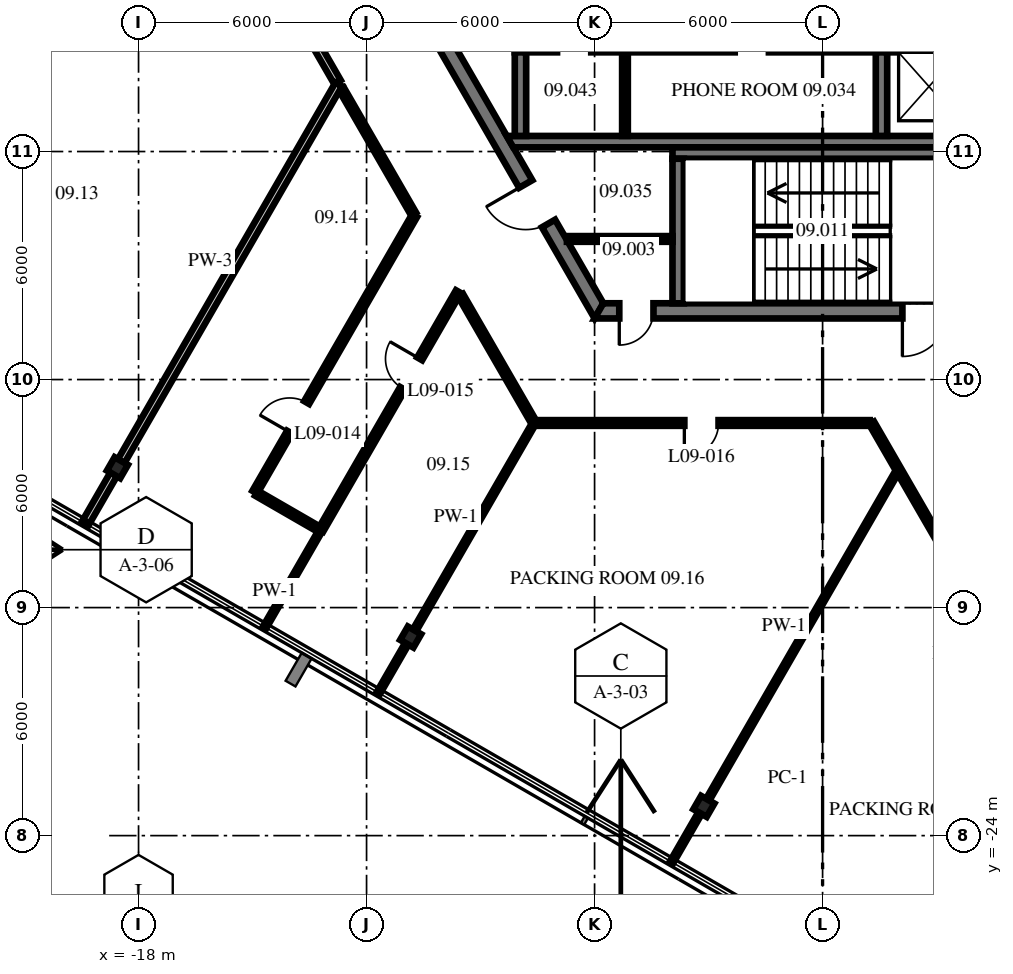
"""IFC4 building model, lengths in metres.
Left out: names, types, materials, properties, quantities, classifications, styles, units other than length and angle.
Written with IfcOpenShell. Run it as: python <this file> out.ifc"""

import sys

from ifc_helpers import new_model, si_unit, direction, frame, frame_2d, origin, origin_2d, place, context, subcontext, project, spatial, polyline, rectangle, i_section, outline, extrude, source, transform, mapped, element, fill, save


model = new_model("IFC4")
c1 = context("Model", 3, precision=1e-05, world=origin(), true_north=direction((0.0, 1.0)))
c2 = subcontext(c1, "Body", "Model", "MODEL_VIEW")
j1 = project(units=[si_unit("LENGTHUNIT", "METRE"), si_unit("PLANEANGLEUNIT", "RADIAN")], contexts=[c1])
p1 = place(None, origin())
s1 = spatial("IfcSite", under=j1, at=p1, CompositionType="ELEMENT")
p2 = place(p1, origin())
s2 = spatial("IfcBuilding", under=s1, at=p2, CompositionType="ELEMENT")
p3 = place(p2, frame((0.0, 0.0, 41.8)))
s3 = spatial("IfcBuildingStorey", under=s2, at=p3, CompositionType="ELEMENT", Elevation=41.8)
m1 = source(origin(), c2, "Body", "SweptSolid", [
    extrude(i_section(OverallWidth=0.404, OverallDepth=0.406, WebThickness=0.027, FlangeThickness=0.044, at=origin_2d()), origin(), (0.0, 0.0, 1.0), 4.3),
])
for number, where, z_axis, x_axis in (
    (1, (-18.556, -14.32, 0.0), (0.0, 0.0, 1.0), (0.866, -0.5, 0.0)),
    (2, (-10.84, -18.775, 0.0), (0.0, 0.0, 1.0), (0.866, -0.5, 0.0)),
    (3, (-3.124, -23.23, 0.0), (0.0, 0.0, 1.0), (0.866, -0.5, 0.0)),
):
    element("IfcColumn", number, at=place(p3, frame(where, z_axis=z_axis, x_axis=x_axis)), inside=s3, PredefinedType="COLUMN", context=c2, shape_type="MappedRepresentation", body=[
        mapped(m1, transform((0.0, 0.0, 0.0), scale=1.0)),
    ])
m2 = source(origin(), c2, "Body", "SweptSolid", [
    extrude(outline(polyline([(-0.115, -0.2), (11.885, -0.2), (11.654, 0.2), (0.115, 0.2), (-0.115, -0.2)])), origin(), (0.0, 0.0, 1.0), 4.1),
])
p4 = place(p3, frame((-11.769, 0.0, 0.0), z_axis=(0.0, 0.0, 1.0), x_axis=(0.499996592174, -0.866027371285, 0.0)))
e4 = element("IfcWall", 4, at=p4, inside=s3, PredefinedType="SHEAR", context=c2, shape_type="MappedRepresentation", body=[
    mapped(m2, transform((0.0, 0.0, 0.0), scale=1.0)),
])
p5 = place(p4, frame((1.405, 0.0, 0.0)))
e5 = element("IfcOpeningElement", 5, at=p5, cuts=e4, PredefinedType="OPENING", context=c2, shape_type="SweptSolid", body=[
    extrude(rectangle(XDim=1.8, YDim=2.1, at=frame_2d((0.9, 1.05))), frame((0.0, 0.21, 0.0), z_axis=(0.0, -1.0, 0.0), x_axis=(1.0, 0.0, 0.0)), (0.0, 0.0, 1.0), 0.42),
])
p6 = place(p4, frame((7.915, 0.0, 0.0)))
e6 = element("IfcOpeningElement", 6, at=p6, cuts=e4, PredefinedType="OPENING", context=c2, shape_type="SweptSolid", body=[
    extrude(rectangle(XDim=1.2, YDim=2.1, at=frame_2d((0.6, 1.05))), frame((0.0, 0.21, 0.0), z_axis=(0.0, -1.0, 0.0), x_axis=(1.0, 0.0, 0.0)), (0.0, 0.0, 1.0), 0.42),
])
p7 = place(p3, frame((-5.885, -10.192, 0.0), z_axis=(0.0, 0.0, 1.0), x_axis=(1.0, 0.0, 0.0)))
e7 = element("IfcWall", 7, at=p7, inside=s3, PredefinedType="SHEAR", context=c2, shape_type="MappedRepresentation", body=[
    mapped(m2, transform((0.0, 0.0, 0.0), scale=1.0)),
])
p8 = place(p7, frame((7.985, 0.0, 0.0)))
e8 = element("IfcOpeningElement", 8, at=p8, cuts=e7, PredefinedType="OPENING", context=c2, shape_type="SweptSolid", body=[
    extrude(rectangle(XDim=1.2, YDim=2.1, at=frame_2d((0.6, 1.05))), frame((0.0, 0.21, 0.0), z_axis=(0.0, -1.0, 0.0), x_axis=(1.0, 0.0, 0.0)), (0.0, 0.0, 1.0), 0.42),
])
p9 = place(p7, frame((0.534, 0.0, 0.0)))
e9 = element("IfcOpeningElement", 9, at=p9, cuts=e7, PredefinedType="OPENING", context=c2, shape_type="SweptSolid", body=[
    extrude(rectangle(XDim=0.9, YDim=2.1, at=frame_2d((0.45, 1.05))), frame((0.0, 0.21, 0.0), z_axis=(0.0, -1.0, 0.0), x_axis=(1.0, 0.0, 0.0)), (0.0, 0.0, 1.0), 0.42),
])
m3 = source(origin(), c2, "Body", "SweptSolid", [
    extrude(rectangle(XDim=12.8, YDim=0.3, at=frame_2d((6.4, 0.0))), origin(), (0.0, 0.0, 1.0), 4.1),
])
p10 = place(p3, frame((-8.1, -3.24, 0.0), z_axis=(0.0, 0.0, 1.0), x_axis=(1.0, 0.0, 0.0)))
e10 = element("IfcWall", 10, at=p10, inside=s3, PredefinedType="SHEAR", context=c2, shape_type="MappedRepresentation", body=[
    mapped(m3, transform((0.0, 0.0, 0.0), scale=1.0)),
])
p11 = place(p10, frame((1.113, 0.0, 0.0)))
e11 = element("IfcOpeningElement", 11, at=p11, cuts=e10, PredefinedType="OPENING", context=c2, shape_type="SweptSolid", body=[
    extrude(rectangle(XDim=0.9, YDim=2.1, at=frame_2d((0.45, 1.05))), frame((0.0, 0.16, 0.0), z_axis=(0.0, -1.0, 0.0), x_axis=(1.0, 0.0, 0.0)), (0.0, 0.0, 1.0), 0.32),
])
p12 = place(p10, frame((5.788, 0.0, 0.0)))
e12 = element("IfcOpeningElement", 12, at=p12, cuts=e10, PredefinedType="OPENING", context=c2, shape_type="SweptSolid", body=[
    extrude(rectangle(XDim=0.9, YDim=2.1, at=frame_2d((0.45, 1.05))), frame((0.0, 0.16, 0.0), z_axis=(0.0, -1.0, 0.0), x_axis=(1.0, 0.0, 0.0)), (0.0, 0.0, 1.0), 0.32),
])
p13 = place(p10, frame((10.35, 0.0, 0.0)))
e13 = element("IfcOpeningElement", 13, at=p13, cuts=e10, PredefinedType="OPENING", context=c2, shape_type="SweptSolid", body=[
    extrude(rectangle(XDim=1.1, YDim=2.1, at=frame_2d((0.55, 1.05))), frame((0.0, 0.16, 0.0), z_axis=(0.0, -1.0, 0.0), x_axis=(1.0, 0.0, 0.0)), (0.0, 0.0, 1.0), 0.32),
])
m4 = source(origin(), c2, "Body", "SweptSolid", [
    extrude(outline(polyline([(12.0, -0.15), (-0.04, -0.15), (-0.213, 0.15), (12.0, 0.15), (12.0, -0.15)])), origin(), (0.0, 0.0, 1.0), 4.1),
])
p14 = place(p3, frame((-8.1, -5.74, 0.0), z_axis=(0.0, 0.0, 1.0), x_axis=(1.0, 0.0, 0.0)))
e14 = element("IfcWall", 14, at=p14, inside=s3, PredefinedType="SHEAR", context=c2, shape_type="MappedRepresentation", body=[
    mapped(m4, transform((0.0, 0.0, 0.0), scale=1.0)),
])
m5 = source(origin(), c2, "Body", "SweptSolid", [
    extrude(rectangle(XDim=2.2, YDim=0.3, at=frame_2d((1.1, 0.0))), origin(), (0.0, 0.0, 1.0), 4.1),
])
for number, where, z_axis, x_axis in (
    (15, (-7.95, -5.59, 0.0), (0.0, 0.0, 1.0), (0.0, 1.0, 0.0)),
    (16, (1.55, -5.59, 0.0), (0.0, 0.0, 1.0), (0.0, 1.0, 0.0)),
):
    element("IfcWall", number, at=place(p3, frame(where, z_axis=z_axis, x_axis=x_axis)), inside=s3, PredefinedType="SHEAR", context=c2, shape_type="MappedRepresentation", body=[
        mapped(m5, transform((0.0, 0.0, 0.0), scale=1.0)),
    ])
m6 = source(origin(), c2, "Body", "SweptSolid", [
    extrude(outline(polyline([(0.0, -0.15), (8.95, -0.15), (8.65, 0.15), (0.0, 0.15), (0.0, -0.15)])), origin(), (0.0, 0.0, 1.0), 4.1),
])
p15 = place(p3, frame((-3.95, -6.04, 0.0), z_axis=(0.0, 0.0, 1.0), x_axis=(1.0, 0.0, 0.0)))
e17 = element("IfcWall", 17, at=p15, inside=s3, PredefinedType="SHEAR", context=c2, shape_type="MappedRepresentation", body=[
    mapped(m6, transform((0.0, 0.0, 0.0), scale=1.0)),
])
m7 = source(origin(), c2, "Body", "SweptSolid", [
    extrude(outline(polyline([(3.8, -0.15), (-0.004, -0.15), (-0.004, 0.15), (3.8, 0.15), (3.8, -0.15)])), origin(), (0.0, 0.0, 1.0), 4.1),
])
p16 = place(p3, frame((-3.8, -9.99, 0.0), z_axis=(0.0, 0.0, 1.0), x_axis=(0.0, 1.0, 0.0)))
e18 = element("IfcWall", 18, at=p16, inside=s3, PredefinedType="SHEAR", context=c2, shape_type="MappedRepresentation", body=[
    mapped(m7, transform((0.0, 0.0, 0.0), scale=1.0)),
])
m8 = source(origin(), c2, "Body", "SweptSolid", [
    extrude(rectangle(XDim=2.2, YDim=0.15, at=frame_2d((1.1, 0.0))), origin(), (0.0, 0.0, 1.0), 4.1),
])
p17 = place(p3, frame((-5.2, -5.59, 0.0), z_axis=(0.0, 0.0, 1.0), x_axis=(0.0, 1.0, 0.0)))
e19 = element("IfcWall", 19, at=p17, inside=s3, PredefinedType="PARTITIONING", context=c2, shape_type="MappedRepresentation", body=[
    mapped(m8, transform((0.0, 0.0, 0.0), scale=1.0)),
])
m9 = source(origin(), c2, "Body", "SweptSolid", [
    extrude(rectangle(XDim=2.777, YDim=0.15, at=frame_2d((1.389, 0.0))), origin(), (0.0, 0.0, 1.0), 4.1),
])
p18 = place(p3, frame((-6.727, -8.3, 0.0), z_axis=(0.0, 0.0, 1.0), x_axis=(1.0, 0.0, 0.0)))
e20 = element("IfcWall", 20, at=p18, inside=s3, PredefinedType="PARTITIONING", context=c2, shape_type="MappedRepresentation", body=[
    mapped(m9, transform((0.0, 0.0, 0.0), scale=1.0)),
])
p19 = place(p3, frame((-15.14, -0.061, 0.0), z_axis=(0.0, 0.0, 1.0), x_axis=(0.500002721793, -0.866023832351, 0.0)))
e21 = element("IfcWall", 21, at=p19, inside=s3, PredefinedType="PARTITIONING", context=c2, shape_type="SweptSolid", body=[
    extrude(rectangle(XDim=4.75, YDim=0.2, at=frame_2d((2.375, 0.0))), origin(), (0.0, 0.0, 1.0), 4.1),
])
p20 = place(p19, frame((1.88, 0.0, 0.0)))
e22 = element("IfcOpeningElement", 22, at=p20, cuts=e21, PredefinedType="OPENING", context=c2, shape_type="SweptSolid", body=[
    extrude(rectangle(XDim=1.0, YDim=2.1, at=frame_2d((0.5, 1.05))), frame((0.0, 0.11, 0.0), z_axis=(0.0, -1.0, 0.0), x_axis=(1.0, 0.0, 0.0)), (0.0, 0.0, 1.0), 0.22),
])
p21 = place(p3, frame((-12.665, -4.348, 0.0), z_axis=(0.0, 0.0, 1.0), x_axis=(0.500009333805, -0.866020014843, 0.0)))
e23 = element("IfcWall", 23, at=p21, inside=s3, PredefinedType="PARTITIONING", context=c2, shape_type="SweptSolid", body=[
    extrude(rectangle(XDim=3.806, YDim=0.15, at=frame_2d((1.903, 0.0))), origin(), (0.0, 0.0, 1.0), 4.1),
])
p22 = place(p3, frame((-9.527, -9.783, 0.0), z_axis=(0.0, 0.0, 1.0), x_axis=(0.500013098431, -0.86601784127, 0.0)))
e24 = element("IfcWall", 24, at=p22, inside=s3, PredefinedType="PARTITIONING", context=c2, shape_type="SweptSolid", body=[
    extrude(rectangle(XDim=3.83, YDim=0.15, at=frame_2d((1.915, 0.0))), origin(), (0.0, 0.0, 1.0), 4.1),
])
p23 = place(p3, frame((1.289, -13.142, 0.0), z_axis=(0.0, 0.0, 1.0), x_axis=(0.500002274473, -0.866024090613, 0.0)))
e25 = element("IfcWall", 25, at=p23, inside=s3, PredefinedType="PARTITIONING", context=c2, shape_type="SweptSolid", body=[
    extrude(rectangle(XDim=19.385, YDim=0.15, at=frame_2d((9.692, 0.0))), origin(), (0.0, 0.0, 1.0), 4.1),
])
p24 = place(p23, frame((6.062, 0.0, 0.0)))
e26 = element("IfcOpeningElement", 26, at=p24, cuts=e25, PredefinedType="OPENING", context=c2, shape_type="SweptSolid", body=[
    extrude(rectangle(XDim=0.9, YDim=2.1, at=frame_2d((0.45, 1.05))), frame((0.0, 0.085, 0.0), z_axis=(0.0, -1.0, 0.0), x_axis=(1.0, 0.0, 0.0)), (0.0, 0.0, 1.0), 0.17),
])
p25 = place(p23, frame((15.05, 0.0, 0.0)))
e27 = element("IfcOpeningElement", 27, at=p25, cuts=e25, PredefinedType="OPENING", context=c2, shape_type="SweptSolid", body=[
    extrude(rectangle(XDim=0.9, YDim=2.1, at=frame_2d((0.45, 1.05))), frame((0.0, 0.085, 0.0), z_axis=(0.0, -1.0, 0.0), x_axis=(1.0, 0.0, 0.0)), (0.0, 0.0, 1.0), 0.17),
])
m10 = source(origin(), c2, "Body", "SweptSolid", [
    extrude(rectangle(XDim=1.89, YDim=0.15, at=frame_2d((0.945, 0.0))), origin(), (0.0, 0.0, 1.0), 4.1),
])
p26 = place(p3, frame((-14.896, -14.991, 0.0), z_axis=(0.0, 0.0, 1.0), x_axis=(0.866000578957, -0.500042995397, 0.0)))
e28 = element("IfcWall", 28, at=p26, inside=s3, PredefinedType="PARTITIONING", context=c2, shape_type="MappedRepresentation", body=[
    mapped(m10, transform((0.0, 0.0, 0.0), scale=1.0)),
])
p27 = place(p3, frame((-7.588, -13.142, 0.0), z_axis=(0.0, 0.0, 1.0), x_axis=(1.0, 0.0, 0.0)))
e29 = element("IfcWall", 29, at=p27, inside=s3, PredefinedType="PARTITIONING", context=c2, shape_type="SweptSolid", body=[
    extrude(rectangle(XDim=8.827, YDim=0.15, at=frame_2d((4.413, 0.0))), origin(), (0.0, 0.0, 1.0), 4.1),
])
p28 = place(p27, frame((3.95, 0.0, 0.0)))
e30 = element("IfcOpeningElement", 30, at=p28, cuts=e29, PredefinedType="OPENING", context=c2, shape_type="SweptSolid", body=[
    extrude(rectangle(XDim=0.9, YDim=2.1, at=frame_2d((0.45, 1.05))), frame((0.0, 0.085, 0.0), z_axis=(0.0, -1.0, 0.0), x_axis=(1.0, 0.0, 0.0)), (0.0, 0.0, 1.0), 0.17),
])
m11 = source(origin(), c2, "Body", "SweptSolid", [
    extrude(rectangle(XDim=1.499, YDim=0.1, at=frame_2d((0.75, 0.0))), origin(), (0.0, 0.0, 1.0), 4.1),
])
p29 = place(p3, frame((-3.969, -24.695, 0.0), z_axis=(0.0, 0.0, 1.0), x_axis=(0.499905760005, 0.866079806435, 0.0)))
e31 = element("IfcWall", 31, at=p29, inside=s3, PredefinedType="PARTITIONING", context=c2, shape_type="MappedRepresentation", body=[
    mapped(m11, transform((0.0, 0.0, 0.0), scale=1.0)),
])
m12 = source(origin(), c2, "Body", "SweptSolid", [
    extrude(rectangle(XDim=9.953, YDim=0.1, at=frame_2d((4.977, 0.0))), origin(), (0.0, 0.0, 1.0), 3.343),
])
p30 = place(p3, frame((-3.027, -23.063, 0.0), z_axis=(0.0, 0.0, 1.0), x_axis=(0.499990692214, 0.866030777571, 0.0)))
e32 = element("IfcWall", 32, at=p30, inside=s3, PredefinedType="PARTITIONING", context=c2, shape_type="MappedRepresentation", body=[
    mapped(m12, transform((0.0, 0.0, 0.0), scale=1.0)),
])
m13 = source(origin(), c2, "Body", "SweptSolid", [
    extrude(rectangle(XDim=1.499, YDim=0.1, at=frame_2d((0.749, 0.0))), origin(), (0.0, 0.0, 1.0), 4.1),
])
p31 = place(p3, frame((-11.686, -20.24, 0.0), z_axis=(0.0, 0.0, 1.0), x_axis=(0.499976292358, 0.866039090965, 0.0)))
e33 = element("IfcWall", 33, at=p31, inside=s3, PredefinedType="PARTITIONING", context=c2, shape_type="MappedRepresentation", body=[
    mapped(m13, transform((0.0, 0.0, 0.0), scale=1.0)),
])
m14 = source(origin(), c2, "Body", "SweptSolid", [
    extrude(rectangle(XDim=6.271, YDim=0.1, at=frame_2d((3.135, 0.0))), origin(), (0.0, 0.0, 1.0), 3.488),
])
p32 = place(p3, frame((-10.743, -18.608, 0.0), z_axis=(0.0, 0.0, 1.0), x_axis=(0.500012281615, 0.866018312875, 0.0)))
e34 = element("IfcWall", 34, at=p32, inside=s3, PredefinedType="PARTITIONING", context=c2, shape_type="MappedRepresentation", body=[
    mapped(m14, transform((0.0, 0.0, 0.0), scale=1.0)),
])
p33 = place(p3, frame((-14.677, -18.513, 0.0), z_axis=(0.0, 0.0, 1.0), x_axis=(0.499959535909, 0.866048764478, 0.0)))
e35 = element("IfcWall", 35, at=p33, inside=s3, PredefinedType="PARTITIONING", context=c2, shape_type="SweptSolid", body=[
    extrude(rectangle(XDim=2.942, YDim=0.1, at=frame_2d((1.471, 0.0))), origin(), (0.0, 0.0, 1.0), 4.1),
])
m15 = source(origin(), c2, "Body", "SweptSolid", [
    extrude(rectangle(XDim=7.249, YDim=0.15, at=frame_2d((3.625, 0.0))), origin(), (0.0, 0.0, 1.0), 4.1),
])
p34 = place(p3, frame((-13.207, -15.965, 0.0), z_axis=(0.0, 0.0, 1.0), x_axis=(0.500014967241, 0.866016762271, 0.0)))
e36 = element("IfcWall", 36, at=p34, inside=s3, PredefinedType="PARTITIONING", context=c2, shape_type="MappedRepresentation", body=[
    mapped(m15, transform((0.0, 0.0, 0.0), scale=1.0)),
])
p35 = place(p34, frame((4.31, 0.0, 0.0)))
e37 = element("IfcOpeningElement", 37, at=p35, cuts=e36, PredefinedType="OPENING", context=c2, shape_type="SweptSolid", body=[
    extrude(rectangle(XDim=0.9, YDim=2.1, at=frame_2d((0.45, 1.05))), frame((0.0, 0.085, 0.0), z_axis=(0.0, -1.0, 0.0), x_axis=(1.0, 0.0, 0.0)), (0.0, 0.0, 1.0), 0.17),
])
p36 = place(p3, frame((-14.939, -14.965, 0.0), z_axis=(0.0, 0.0, 1.0), x_axis=(0.499994897466, 0.866028349714, 0.0)))
e38 = element("IfcWall", 38, at=p36, inside=s3, PredefinedType="PARTITIONING", context=c2, shape_type="SweptSolid", body=[
    extrude(rectangle(XDim=8.403, YDim=0.15, at=frame_2d((4.202, 0.0))), origin(), (0.0, 0.0, 1.0), 4.1),
])
p37 = place(p36, frame((1.826, 0.0, 0.0)))
e39 = element("IfcOpeningElement", 39, at=p37, cuts=e38, PredefinedType="OPENING", context=c2, shape_type="SweptSolid", body=[
    extrude(rectangle(XDim=0.9, YDim=2.1, at=frame_2d((0.45, 1.05))), frame((0.0, 0.085, 0.0), z_axis=(0.0, -1.0, 0.0), x_axis=(1.0, 0.0, 0.0)), (0.0, 0.0, 1.0), 0.17),
])
m16 = source(origin(), c2, "Body", "SweptSolid", [
    extrude(rectangle(XDim=1.499, YDim=0.2, at=frame_2d((0.749, 0.0))), origin(), (0.0, 0.0, 1.0), 4.1),
])
p38 = place(p3, frame((-19.402, -15.785, 0.0), z_axis=(0.0, 0.0, 1.0), x_axis=(0.499976292358, 0.866039090965, 0.0)))
e40 = element("IfcWall", 40, at=p38, inside=s3, PredefinedType="PARTITIONING", context=c2, shape_type="MappedRepresentation", body=[
    mapped(m16, transform((0.0, 0.0, 0.0), scale=1.0)),
])
m17 = source(origin(), c2, "Body", "SweptSolid", [
    extrude(rectangle(XDim=11.455, YDim=0.2, at=frame_2d((5.728, 0.0))), origin(), (0.0, 0.0, 1.0), 3.343),
])
p39 = place(p3, frame((-18.459, -14.153, 0.0), z_axis=(0.0, 0.0, 1.0), x_axis=(0.500008416231, 0.866020544617, 0.0)))
e41 = element("IfcWall", 41, at=p39, inside=s3, PredefinedType="PARTITIONING", context=c2, shape_type="MappedRepresentation", body=[
    mapped(m17, transform((0.0, 0.0, 0.0), scale=1.0)),
])
p40 = place(p8, frame((1.2, 0.0, 0.0), z_axis=(0.0, 0.0, 1.0), x_axis=(-1.0, 0.0, 0.0)))
e42 = element("IfcDoor", 42, at=p40, inside=s3, OperationType="SINGLE_SWING_RIGHT", PredefinedType="DOOR", context=c2, shape_type="SweptSolid", body=[
    extrude(rectangle(XDim=1.2, YDim=2.1, at=frame_2d((0.6, 1.05))), frame((0.0, 0.025, 0.0), z_axis=(0.0, -1.0, 0.0), x_axis=(1.0, 0.0, 0.0)), (0.0, 0.0, 1.0), 0.05),
])
fill(e8, e42)
p41 = place(p6, frame((1.2, 0.0, 0.0), z_axis=(0.0, 0.0, 1.0), x_axis=(-1.0, 0.0, 0.0)))
e43 = element("IfcDoor", 43, at=p41, inside=s3, OperationType="SINGLE_SWING_RIGHT", PredefinedType="DOOR", context=c2, shape_type="SweptSolid", body=[
    extrude(rectangle(XDim=1.2, YDim=2.1, at=frame_2d((0.6, 1.05))), frame((0.0, 0.025, 0.0), z_axis=(0.0, -1.0, 0.0), x_axis=(1.0, 0.0, 0.0)), (0.0, 0.0, 1.0), 0.05),
])
fill(e6, e43)
p42 = place(p9, frame((0.9, 0.0, 0.0), z_axis=(0.0, 0.0, 1.0), x_axis=(-1.0, 0.0, 0.0)))
e44 = element("IfcDoor", 44, at=p42, inside=s3, OperationType="SINGLE_SWING_RIGHT", PredefinedType="DOOR", context=c2, shape_type="SweptSolid", body=[
    extrude(rectangle(XDim=0.9, YDim=2.1, at=frame_2d((0.45, 1.05))), frame((0.0, 0.025, 0.0), z_axis=(0.0, -1.0, 0.0), x_axis=(1.0, 0.0, 0.0)), (0.0, 0.0, 1.0), 0.05),
])
fill(e9, e44)
p43 = place(p37, origin())
e45 = element("IfcDoor", 45, at=p43, inside=s3, OperationType="SINGLE_SWING_LEFT", PredefinedType="DOOR", context=c2, shape_type="SweptSolid", body=[
    extrude(rectangle(XDim=0.9, YDim=2.1, at=frame_2d((0.45, 1.05))), frame((0.0, 0.025, 0.0), z_axis=(0.0, -1.0, 0.0), x_axis=(1.0, 0.0, 0.0)), (0.0, 0.0, 1.0), 0.05),
])
fill(e39, e45)
p44 = place(p35, origin())
e46 = element("IfcDoor", 46, at=p44, inside=s3, OperationType="SINGLE_SWING_LEFT", PredefinedType="DOOR", context=c2, shape_type="SweptSolid", body=[
    extrude(rectangle(XDim=0.9, YDim=2.1, at=frame_2d((0.45, 1.05))), frame((0.0, 0.025, 0.0), z_axis=(0.0, -1.0, 0.0), x_axis=(1.0, 0.0, 0.0)), (0.0, 0.0, 1.0), 0.05),
])
fill(e37, e46)
p45 = place(p28, origin())
e47 = element("IfcDoor", 47, at=p45, inside=s3, OperationType="SINGLE_SWING_RIGHT", PredefinedType="DOOR", context=c2, shape_type="SweptSolid", body=[
    extrude(rectangle(XDim=0.9, YDim=2.1, at=frame_2d((0.45, 1.05))), frame((0.0, 0.025, 0.0), z_axis=(0.0, -1.0, 0.0), x_axis=(1.0, 0.0, 0.0)), (0.0, 0.0, 1.0), 0.05),
])
fill(e30, e47)
save(model, sys.argv[1])
